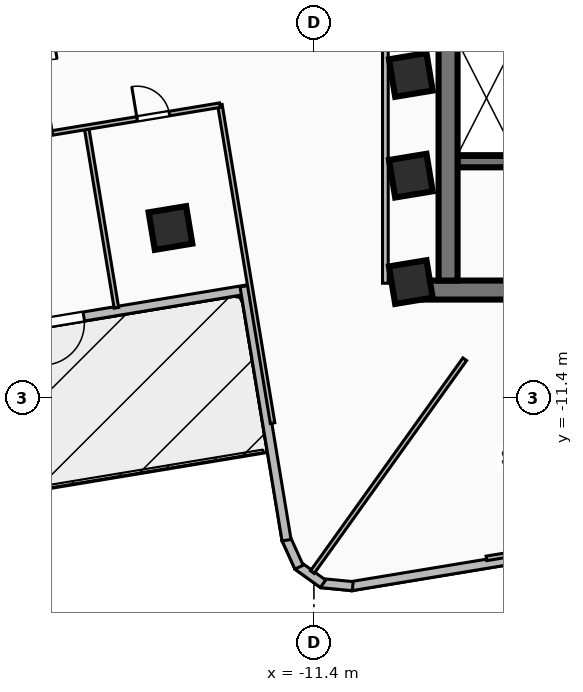
"""IFC4 building model, lengths in metres.
Left out: names, types, materials, properties, quantities, classifications, styles, units other than length and angle.
Written with IfcOpenShell. Run it as: python <this file> out.ifc"""

import sys

from ifc_helpers import new_model, si_unit, direction, frame, frame_2d, origin, origin_2d, place, context, subcontext, project, spatial, rectangle, extrude, element, fill, save


model = new_model("IFC4")
c1 = context("Model", 3, precision=1e-05, world=origin(), true_north=direction((0.0, 1.0)))
c2 = subcontext(c1, "Body", "Model", "MODEL_VIEW")
j1 = project(units=[si_unit("LENGTHUNIT", "METRE"), si_unit("PLANEANGLEUNIT", "RADIAN")], contexts=[c1])
p1 = place(None, origin())
s1 = spatial("IfcSite", under=j1, at=p1, CompositionType="ELEMENT")
p2 = place(p1, origin())
s2 = spatial("IfcBuilding", under=s1, at=p2, CompositionType="ELEMENT")
p3 = place(p2, frame((0.0, 0.0, 96.48)))
s3 = spatial("IfcBuildingStorey", under=s2, at=p3, CompositionType="ELEMENT", Elevation=96.48)
p4 = place(p3, frame((8.78, -8.56, 0.0), z_axis=(0.0, 0.0, 1.0), x_axis=(-1.0, 0.0, 0.0)))
e1 = element("IfcWall", 1, at=p4, inside=s3, PredefinedType="SHEAR", context=c2, shape_type="SweptSolid", body=[
    extrude(rectangle(XDim=17.56, YDim=0.5, at=frame_2d((8.78, 0.0))), origin(), (0.0, 0.0, 1.0), 3.34),
])
p5 = place(p3, frame((-7.87, -8.31, 0.0), z_axis=(0.0, 0.0, 1.0), x_axis=(0.0, 1.0, 0.0)))
e2 = element("IfcWall", 2, at=p5, inside=s3, PredefinedType="SHEAR", context=c2, shape_type="SweptSolid", body=[
    extrude(rectangle(XDim=6.31, YDim=0.5, at=frame_2d((3.155, 0.0))), origin(), (0.0, 0.0, 1.0), 3.34),
])
p6 = place(p3, frame((-7.62, -5.18, 0.0), z_axis=(0.0, 0.0, 1.0), x_axis=(1.0, 0.0, 0.0)))
e3 = element("IfcWall", 3, at=p6, inside=s3, PredefinedType="SOLIDWALL", context=c2, shape_type="SweptSolid", body=[
    extrude(rectangle(XDim=15.24, YDim=0.3, at=frame_2d((7.62, 0.0))), origin(), (0.0, 0.0, 1.0), 3.34),
])
p7 = place(p6, frame((5.77, 0.0, 0.0)))
e4 = element("IfcOpeningElement", 4, at=p7, cuts=e3, PredefinedType="OPENING", context=c2, shape_type="SweptSolid", body=[
    extrude(rectangle(XDim=1.1, YDim=2.15, at=frame_2d((0.55, 1.075))), frame((0.0, 0.16, 0.0), z_axis=(0.0, -1.0, 0.0), x_axis=(1.0, 0.0, 0.0)), (0.0, 0.0, 1.0), 0.32),
])
p8 = place(p6, frame((7.97, 0.0, 0.0)))
e5 = element("IfcOpeningElement", 5, at=p8, cuts=e3, PredefinedType="OPENING", context=c2, shape_type="SweptSolid", body=[
    extrude(rectangle(XDim=1.0, YDim=2.1, at=frame_2d((0.5, 1.05))), frame((0.0, 0.16, 0.0), z_axis=(0.0, -1.0, 0.0), x_axis=(1.0, 0.0, 0.0)), (0.0, 0.0, 1.0), 0.32),
])
for number, where, z_axis, x_axis in (
    (6, (-8.85, -5.55, 0.0), (0.0, 0.0, 1.0), (0.987, 0.163, 0.0)),
    (7, (-8.85, -2.9, 0.0), (0.0, 0.0, 1.0), (0.987, 0.163, 0.0)),
    (8, (-8.85, -8.35, 0.0), (0.0, 0.0, 1.0), (0.987, 0.163, 0.0)),
    (9, (-15.175, -6.927, 0.0), (0.0, 0.0, 1.0), (0.987, 0.163, 0.0)),
):
    element("IfcColumn", number, at=place(p3, frame(where, z_axis=z_axis, x_axis=x_axis)), inside=s3, PredefinedType="COLUMN", context=c2, shape_type="SweptSolid", body=[
        extrude(rectangle(XDim=1.0, YDim=1.0, at=origin_2d()), origin(), (0.0, 0.0, 1.0), 3.6),
    ])
p9 = place(p3, frame((-13.115, -8.537, 0.0), z_axis=(0.0, 0.0, 1.0), x_axis=(-0.986576548161, -0.163299463007, 0.0)))
e10 = element("IfcWall", 10, at=p9, inside=s3, PredefinedType="SOLIDWALL", context=c2, shape_type="SweptSolid", body=[
    extrude(rectangle(XDim=16.277, YDim=0.24, at=frame_2d((8.138, 0.0))), origin(), (0.0, 0.0, 1.0), 3.34),
])
p10 = place(p9, frame((4.4, 0.0, 0.0)))
e11 = element("IfcOpeningElement", 11, at=p10, cuts=e10, PredefinedType="OPENING", context=c2, shape_type="SweptSolid", body=[
    extrude(rectangle(XDim=1.1, YDim=2.1, at=frame_2d((0.55, 1.05))), frame((0.0, 0.13, 0.0), z_axis=(0.0, -1.0, 0.0), x_axis=(1.0, 0.0, 0.0)), (0.0, 0.0, 1.0), 0.26),
])
p11 = place(p3, frame((-4.276, -15.335, 0.0), z_axis=(0.0, 0.0, 1.0), x_axis=(-0.986586851863, -0.16323720082, 0.0)))
e12 = element("IfcWall", 12, at=p11, inside=s3, PredefinedType="SOLIDWALL", context=c2, shape_type="SweptSolid", body=[
    extrude(rectangle(XDim=6.237, YDim=0.24, at=frame_2d((3.118, 0.0))), origin(), (0.0, 0.0, 1.0), 2.486),
])
p12 = place(p3, frame((-10.379, -16.351, 0.0), z_axis=(0.0, 0.0, 1.0), x_axis=(-0.995335447313, 0.096474594184, 0.0)))
e13 = element("IfcWall", 13, at=p12, inside=s3, PredefinedType="SOLIDWALL", context=c2, shape_type="SweptSolid", body=[
    extrude(rectangle(XDim=0.83, YDim=0.24, at=frame_2d((0.415, 0.0))), origin(), (0.0, 0.0, 1.0), 3.34),
])
p13 = place(p3, frame((-11.16, -16.288, 0.0), z_axis=(0.0, 0.0, 1.0), x_axis=(-0.812068662375, 0.583561896965, 0.0)))
e14 = element("IfcWall", 14, at=p13, inside=s3, PredefinedType="SOLIDWALL", context=c2, shape_type="SweptSolid", body=[
    extrude(rectangle(XDim=0.814, YDim=0.24, at=frame_2d((0.407, 0.0))), origin(), (0.0, 0.0, 1.0), 3.34),
])
p14 = place(p3, frame((-11.791, -15.851, 0.0), z_axis=(0.0, 0.0, 1.0), x_axis=(-0.412696106872, 0.910868773958, 0.0)))
e15 = element("IfcWall", 15, at=p14, inside=s3, PredefinedType="SOLIDWALL", context=c2, shape_type="SweptSolid", body=[
    extrude(rectangle(XDim=0.831, YDim=0.24, at=frame_2d((0.416, 0.0))), origin(), (0.0, 0.0, 1.0), 3.34),
])
p15 = place(p3, frame((-12.12, -15.142, 0.0), z_axis=(0.0, 0.0, 1.0), x_axis=(-0.163241835244, 0.986586085056, 0.0)))
e16 = element("IfcWall", 16, at=p15, inside=s3, PredefinedType="SOLIDWALL", context=c2, shape_type="SweptSolid", body=[
    extrude(rectangle(XDim=6.775, YDim=0.24, at=frame_2d((3.387, 0.0))), origin(), (0.0, 0.0, 1.0), 3.34),
])
p16 = place(p3, frame((-9.52, -8.38, 0.0), z_axis=(0.0, 0.0, 1.0), x_axis=(0.0, 1.0, 0.0)))
e17 = element("IfcWall", 17, at=p16, inside=s3, PredefinedType="PARTITIONING", context=c2, shape_type="SweptSolid", body=[
    extrude(rectangle(XDim=6.63, YDim=0.15, at=frame_2d((3.315, 0.0))), origin(), (0.0, 0.0, 1.0), 2.486),
])
p17 = place(p3, frame((-7.431, -10.38, 0.0), z_axis=(0.0, 0.0, 1.0), x_axis=(-0.582126278944, -0.813098392178, 0.0)))
e18 = element("IfcWall", 18, at=p17, inside=s3, PredefinedType="PARTITIONING", context=c2, shape_type="SweptSolid", body=[
    extrude(rectangle(XDim=6.889, YDim=0.12, at=frame_2d((3.444, 0.0))), origin(), (0.0, 0.0, 1.0), 2.486),
])
p18 = place(p3, frame((-13.874, -3.686, 0.0), z_axis=(0.0, 0.0, 1.0), x_axis=(0.163270245909, -0.98658138377, 0.0)))
e19 = element("IfcWall", 19, at=p18, inside=s3, PredefinedType="PARTITIONING", context=c2, shape_type="SweptSolid", body=[
    extrude(rectangle(XDim=8.489, YDim=0.12, at=frame_2d((4.245, 0.0))), origin(), (0.0, 0.0, 1.0), 2.486),
])
p19 = place(p3, frame((-17.382, -4.297, 0.0), z_axis=(0.0, 0.0, 1.0), x_axis=(0.163556674632, -0.986533939702, 0.0)))
e20 = element("IfcWall", 20, at=p19, inside=s3, PredefinedType="PARTITIONING", context=c2, shape_type="SweptSolid", body=[
    extrude(rectangle(XDim=4.794, YDim=0.12, at=frame_2d((2.397, 0.0))), origin(), (0.0, 0.0, 1.0), 2.486),
])
p20 = place(p3, frame((-20.029, -4.715, 0.0), z_axis=(0.0, 0.0, 1.0), x_axis=(0.986548927366, 0.163466247017, 0.0)))
e21 = element("IfcWall", 21, at=p20, inside=s3, PredefinedType="PARTITIONING", context=c2, shape_type="SweptSolid", body=[
    extrude(rectangle(XDim=6.24, YDim=0.12, at=frame_2d((3.12, 0.0))), origin(), (0.0, 0.0, 1.0), 3.34),
])
p21 = place(p20, frame((4.03, 0.0, 0.0)))
e22 = element("IfcOpeningElement", 22, at=p21, cuts=e21, PredefinedType="OPENING", context=c2, shape_type="SweptSolid", body=[
    extrude(rectangle(XDim=0.86, YDim=2.04, at=frame_2d((0.43, 1.02))), frame((0.0, 0.07, 0.0), z_axis=(0.0, -1.0, 0.0), x_axis=(1.0, 0.0, 0.0)), (0.0, 0.0, 1.0), 0.14),
])
p22 = place(p20, frame((0.91, 0.0, 0.0)))
e23 = element("IfcOpeningElement", 23, at=p22, cuts=e21, PredefinedType="OPENING", context=c2, shape_type="SweptSolid", body=[
    extrude(rectangle(XDim=0.86, YDim=2.04, at=frame_2d((0.43, 1.02))), frame((0.0, 0.07, 0.0), z_axis=(0.0, -1.0, 0.0), x_axis=(1.0, 0.0, 0.0)), (0.0, 0.0, 1.0), 0.14),
])
p23 = place(p3, frame((-6.86, -15.62, 0.0), z_axis=(0.0, 0.0, 1.0), x_axis=(0.986575116384, 0.16330811288, 0.0)))
e24 = element("IfcWall", 24, at=p23, inside=s3, PredefinedType="PARTITIONING", context=c2, shape_type="SweptSolid", body=[
    extrude(rectangle(XDim=7.949, YDim=0.12, at=frame_2d((3.974, 0.0))), origin(), (0.0, 0.0, 1.0), 2.486),
])
p24 = place(p10, origin())
e25 = element("IfcDoor", 25, at=p24, inside=s3, OperationType="SINGLE_SWING_RIGHT", PredefinedType="DOOR", context=c2, shape_type="SweptSolid", body=[
    extrude(rectangle(XDim=1.1, YDim=2.1, at=frame_2d((0.55, 1.05))), frame((0.0, 0.025, 0.0), z_axis=(0.0, -1.0, 0.0), x_axis=(1.0, 0.0, 0.0)), (0.0, 0.0, 1.0), 0.05),
])
fill(e11, e25)
p25 = place(p21, origin())
e26 = element("IfcDoor", 26, at=p25, inside=s3, OperationType="SINGLE_SWING_LEFT", PredefinedType="DOOR", context=c2, shape_type="SweptSolid", body=[
    extrude(rectangle(XDim=0.86, YDim=2.04, at=frame_2d((0.43, 1.02))), frame((0.0, 0.025, 0.0), z_axis=(0.0, -1.0, 0.0), x_axis=(1.0, 0.0, 0.0)), (0.0, 0.0, 1.0), 0.05),
])
fill(e22, e26)
p26 = place(p22, origin())
e27 = element("IfcDoor", 27, at=p26, inside=s3, OperationType="SINGLE_SWING_RIGHT", PredefinedType="DOOR", context=c2, shape_type="SweptSolid", body=[
    extrude(rectangle(XDim=0.86, YDim=2.04, at=frame_2d((0.43, 1.02))), frame((0.0, 0.025, 0.0), z_axis=(0.0, -1.0, 0.0), x_axis=(1.0, 0.0, 0.0)), (0.0, 0.0, 1.0), 0.05),
])
fill(e23, e27)
save(model, sys.argv[1])
